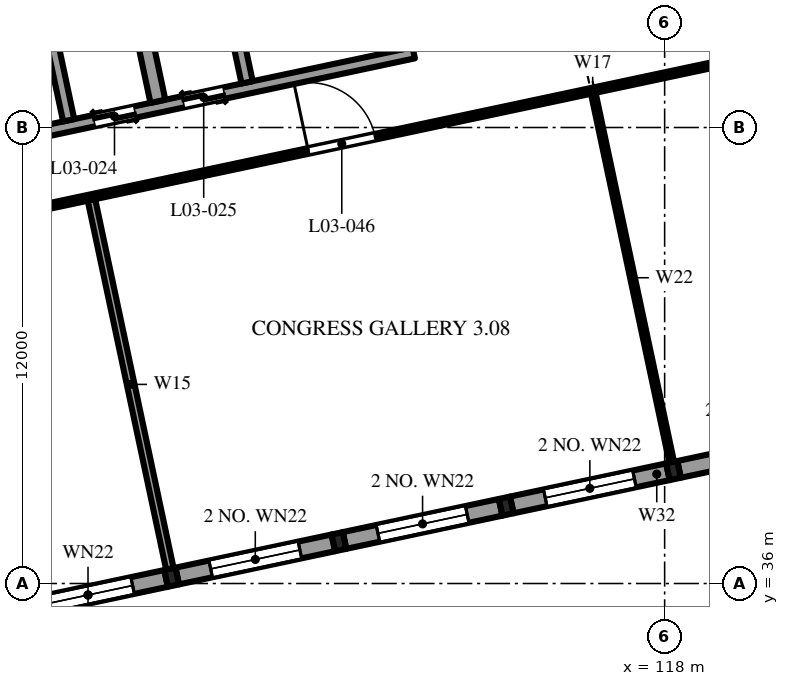
"""IFC4 building model, lengths in metres.
Left out: names, types, materials, properties, quantities, classifications, styles, units other than length and angle.
Written with IfcOpenShell. Run it as: python <this file> out.ifc"""

import sys

from ifc_helpers import new_model, si_unit, direction, frame, frame_2d, origin, origin_2d, place, context, subcontext, project, spatial, polyline, rectangle, i_section, outline, extrude, element, fill, save


model = new_model("IFC4")
c1 = context("Model", 3, precision=1e-05, world=origin(), true_north=direction((0.0, 1.0)))
c2 = subcontext(c1, "Body", "Model", "MODEL_VIEW")
j1 = project(units=[si_unit("LENGTHUNIT", "METRE"), si_unit("PLANEANGLEUNIT", "RADIAN")], contexts=[c1])
p1 = place(None, origin())
s1 = spatial("IfcSite", under=j1, at=p1, CompositionType="ELEMENT")
p2 = place(p1, origin())
s2 = spatial("IfcBuilding", under=s1, at=p2, CompositionType="ELEMENT")
p3 = place(p2, frame((0.0, 0.0, 16.8)))
s3 = spatial("IfcBuildingStorey", under=s2, at=p3, CompositionType="ELEMENT", Elevation=16.8)
for number, where, z_axis, x_axis in (
    (1, (105.028, 36.165, 0.0), (0.0, 0.0, 1.0), (0.978, 0.208, 0.0)),
    (2, (109.429, 37.101, 0.0), (0.0, 0.0, 1.0), (0.978, 0.208, 0.0)),
    (3, (113.831, 38.036, 0.0), (0.0, 0.0, 1.0), (0.978, 0.208, 0.0)),
    (4, (118.233, 38.972, 0.0), (0.0, 0.0, 1.0), (0.978, 0.208, 0.0)),
):
    element("IfcColumn", number, at=place(p3, frame(where, z_axis=z_axis, x_axis=x_axis)), inside=s3, PredefinedType="COLUMN", context=c2, shape_type="SweptSolid", body=[
        extrude(i_section(OverallWidth=0.3, OverallDepth=0.45, WebThickness=0.014, FlangeThickness=0.026, FilletRadius=0.027, at=origin_2d()), origin(), (0.0, 0.0, 1.0), 4.8),
    ])
p4 = place(p3, frame((97.997, 47.118, 0.0), z_axis=(0.0, 0.0, 1.0), x_axis=(0.978147662755, 0.20791139903, 0.0)))
e5 = element("IfcWall", 5, at=p4, inside=s3, PredefinedType="SHEAR", context=c2, shape_type="SweptSolid", body=[
    extrude(outline(polyline([(0.0, 0.0), (13.7, 0.0), (13.7, 9.076), (0.0, 8.344), (0.0, 0.0)])), frame((0.0, 0.15, 0.0), z_axis=(0.0, -1.0, 0.0), x_axis=(1.0, 0.0, 0.0)), (0.0, 0.0, 1.0), 0.3),
])
p5 = place(p4, frame((5.1, 0.0, 0.0)))
e6 = element("IfcOpeningElement", 6, at=p5, cuts=e5, PredefinedType="OPENING", context=c2, shape_type="SweptSolid", body=[
    extrude(rectangle(XDim=1.1, YDim=2.1, at=frame_2d((0.55, 1.05))), frame((0.0, 0.16, 0.0), z_axis=(0.0, -1.0, 0.0), x_axis=(1.0, 0.0, 0.0)), (0.0, 0.0, 1.0), 0.32),
])
p6 = place(p4, frame((7.5, 0.0, 0.0)))
e7 = element("IfcOpeningElement", 7, at=p6, cuts=e5, PredefinedType="OPENING", context=c2, shape_type="SweptSolid", body=[
    extrude(rectangle(XDim=1.1, YDim=2.1, at=frame_2d((0.55, 1.05))), frame((0.0, 0.16, 0.0), z_axis=(0.0, -1.0, 0.0), x_axis=(1.0, 0.0, 0.0)), (0.0, 0.0, 1.0), 0.32),
])
p7 = place(p3, frame((100.655, 56.015, 0.0), z_axis=(0.0, 0.0, 1.0), x_axis=(0.207915693476, -0.978146749934, 0.0)))
e8 = element("IfcWall", 8, at=p7, inside=s3, PredefinedType="SHEAR", context=c2, shape_type="SweptSolid", body=[
    extrude(outline(polyline([(0.0, 0.0), (8.0, 0.0), (8.0, 8.574), (0.0, 8.155), (0.0, 0.0)])), frame((0.0, 0.15, 0.0), z_axis=(0.0, -1.0, 0.0), x_axis=(1.0, 0.0, 0.0)), (0.0, 0.0, 1.0), 0.3),
])
p8 = place(p3, frame((105.35, 57.013, 0.0), z_axis=(0.0, 0.0, 1.0), x_axis=(0.207915693476, -0.978146749934, 0.0)))
e9 = element("IfcWall", 9, at=p8, inside=s3, PredefinedType="SHEAR", context=c2, shape_type="SweptSolid", body=[
    extrude(outline(polyline([(0.0, 0.0), (8.0, 0.0), (8.0, 8.831), (0.0, 8.411), (0.0, 0.0)])), frame((0.0, 0.15, 0.0), z_axis=(0.0, -1.0, 0.0), x_axis=(1.0, 0.0, 0.0)), (0.0, 0.0, 1.0), 0.3),
])
p9 = place(p3, frame((104.042, 51.623, 0.0), z_axis=(0.0, 0.0, 1.0), x_axis=(0.207917150959, -0.978146440129, 0.0)))
e10 = element("IfcWall", 10, at=p9, inside=s3, PredefinedType="SHEAR", context=c2, shape_type="SweptSolid", body=[
    extrude(outline(polyline([(0.0, 0.0), (3.0, 0.0), (3.0, 8.702), (0.0, 8.545), (0.0, 0.0)])), frame((0.0, 0.2, 0.0), z_axis=(0.0, -1.0, 0.0), x_axis=(1.0, 0.0, 0.0)), (0.0, 0.0, 1.0), 0.4),
])
p10 = place(p3, frame((100.773, 35.261, 0.0), z_axis=(0.0, 0.0, 1.0), x_axis=(0.978143927149, 0.207928972925, 0.0)))
e11 = element("IfcWall", 11, at=p10, inside=s3, PredefinedType="SOLIDWALL", context=c2, shape_type="SweptSolid", body=[
    extrude(outline(polyline([(0.0, 0.0), (4.2, 0.0), (4.2, 10.52), (0.0, 10.295), (0.0, 0.0)])), frame((0.0, 0.225, 0.0), z_axis=(0.0, -1.0, 0.0), x_axis=(1.0, 0.0, 0.0)), (0.0, 0.0, 1.0), 0.45),
])
p11 = place(p10, frame((0.9, 0.0, 0.6)))
e12 = element("IfcOpeningElement", 12, at=p11, cuts=e11, PredefinedType="OPENING", context=c2, shape_type="SweptSolid", body=[
    extrude(rectangle(XDim=2.4, YDim=2.7, at=frame_2d((1.2, 1.35))), frame((0.0, 0.235, 0.0), z_axis=(0.0, -1.0, 0.0), x_axis=(1.0, 0.0, 0.0)), (0.0, 0.0, 1.0), 0.47),
])
p12 = place(p10, frame((0.9, 0.0, 5.1)))
e13 = element("IfcOpeningElement", 13, at=p12, cuts=e11, PredefinedType="OPENING", context=c2, shape_type="SweptSolid", body=[
    extrude(rectangle(XDim=2.4, YDim=2.4, at=frame_2d((1.2, 1.2))), frame((0.0, 0.235, 0.0), z_axis=(0.0, -1.0, 0.0), x_axis=(1.0, 0.0, 0.0)), (0.0, 0.0, 1.0), 0.47),
])
p13 = place(p3, frame((105.174, 36.197, 0.0), z_axis=(0.0, 0.0, 1.0), x_axis=(0.978155748334, 0.207873355681, 0.0)))
e14 = element("IfcWall", 14, at=p13, inside=s3, PredefinedType="SOLIDWALL", context=c2, shape_type="SweptSolid", body=[
    extrude(outline(polyline([(0.0, 0.0), (4.2, 0.0), (4.2, 10.76), (0.0, 10.536), (0.0, 0.0)])), frame((0.0, 0.225, 0.0), z_axis=(0.0, -1.0, 0.0), x_axis=(1.0, 0.0, 0.0)), (0.0, 0.0, 1.0), 0.45),
])
p14 = place(p13, frame((0.9, 0.0, 0.9)))
e15 = element("IfcOpeningElement", 15, at=p14, cuts=e14, PredefinedType="OPENING", context=c2, shape_type="SweptSolid", body=[
    extrude(rectangle(XDim=2.4, YDim=2.4, at=frame_2d((1.2, 1.2))), frame((0.0, 0.235, 0.0), z_axis=(0.0, -1.0, 0.0), x_axis=(1.0, 0.0, 0.0)), (0.0, 0.0, 1.0), 0.47),
])
p15 = place(p13, frame((0.9, 0.0, 5.1)))
e16 = element("IfcOpeningElement", 16, at=p15, cuts=e14, PredefinedType="OPENING", context=c2, shape_type="SweptSolid", body=[
    extrude(rectangle(XDim=2.4, YDim=2.4, at=frame_2d((1.2, 1.2))), frame((0.0, 0.235, 0.0), z_axis=(0.0, -1.0, 0.0), x_axis=(1.0, 0.0, 0.0)), (0.0, 0.0, 1.0), 0.47),
])
p16 = place(p3, frame((109.576, 37.132, 0.0), z_axis=(0.0, 0.0, 1.0), x_axis=(0.978146440129, 0.207917150959, 0.0)))
e17 = element("IfcWall", 17, at=p16, inside=s3, PredefinedType="SOLIDWALL", context=c2, shape_type="SweptSolid", body=[
    extrude(outline(polyline([(0.0, 0.0), (4.2, 0.0), (4.2, 11.001), (0.0, 10.776), (0.0, 0.0)])), frame((0.0, 0.225, 0.0), z_axis=(0.0, -1.0, 0.0), x_axis=(1.0, 0.0, 0.0)), (0.0, 0.0, 1.0), 0.45),
])
p17 = place(p16, frame((0.9, 0.0, 0.9)))
e18 = element("IfcOpeningElement", 18, at=p17, cuts=e17, PredefinedType="OPENING", context=c2, shape_type="SweptSolid", body=[
    extrude(rectangle(XDim=2.4, YDim=2.4, at=frame_2d((1.2, 1.2))), frame((0.0, 0.235, 0.0), z_axis=(0.0, -1.0, 0.0), x_axis=(1.0, 0.0, 0.0)), (0.0, 0.0, 1.0), 0.47),
])
p18 = place(p16, frame((0.9, 0.0, 5.1)))
e19 = element("IfcOpeningElement", 19, at=p18, cuts=e17, PredefinedType="OPENING", context=c2, shape_type="SweptSolid", body=[
    extrude(rectangle(XDim=2.4, YDim=2.4, at=frame_2d((1.2, 1.2))), frame((0.0, 0.235, 0.0), z_axis=(0.0, -1.0, 0.0), x_axis=(1.0, 0.0, 0.0)), (0.0, 0.0, 1.0), 0.47),
])
p19 = place(p3, frame((113.978, 38.068, 0.0), z_axis=(0.0, 0.0, 1.0), x_axis=(0.978143927149, 0.207928972925, 0.0)))
e20 = element("IfcWall", 20, at=p19, inside=s3, PredefinedType="SOLIDWALL", context=c2, shape_type="SweptSolid", body=[
    extrude(outline(polyline([(0.0, 0.0), (4.2, 0.0), (4.2, 11.242), (0.0, 11.017), (0.0, 0.0)])), frame((0.0, 0.225, 0.0), z_axis=(0.0, -1.0, 0.0), x_axis=(1.0, 0.0, 0.0)), (0.0, 0.0, 1.0), 0.45),
])
p20 = place(p19, frame((0.9, 0.0, 0.9)))
e21 = element("IfcOpeningElement", 21, at=p20, cuts=e20, PredefinedType="OPENING", context=c2, shape_type="SweptSolid", body=[
    extrude(rectangle(XDim=2.4, YDim=2.4, at=frame_2d((1.2, 1.2))), frame((0.0, 0.235, 0.0), z_axis=(0.0, -1.0, 0.0), x_axis=(1.0, 0.0, 0.0)), (0.0, 0.0, 1.0), 0.47),
])
p21 = place(p19, frame((0.9, 0.0, 5.1)))
e22 = element("IfcOpeningElement", 22, at=p21, cuts=e20, PredefinedType="OPENING", context=c2, shape_type="SweptSolid", body=[
    extrude(rectangle(XDim=2.4, YDim=2.4, at=frame_2d((1.2, 1.2))), frame((0.0, 0.235, 0.0), z_axis=(0.0, -1.0, 0.0), x_axis=(1.0, 0.0, 0.0)), (0.0, 0.0, 1.0), 0.47),
])
p22 = place(p3, frame((118.379, 39.003, 0.0), z_axis=(0.0, 0.0, 1.0), x_axis=(0.978143927149, 0.207928972925, 0.0)))
e23 = element("IfcWall", 23, at=p22, inside=s3, PredefinedType="SOLIDWALL", context=c2, shape_type="SweptSolid", body=[
    extrude(outline(polyline([(0.0, 0.0), (4.2, 0.0), (4.2, 11.483), (0.0, 11.258), (0.0, 0.0)])), frame((0.0, 0.225, 0.0), z_axis=(0.0, -1.0, 0.0), x_axis=(1.0, 0.0, 0.0)), (0.0, 0.0, 1.0), 0.45),
])
p23 = place(p22, frame((0.9, 0.0, 0.9)))
e24 = element("IfcOpeningElement", 24, at=p23, cuts=e23, PredefinedType="OPENING", context=c2, shape_type="SweptSolid", body=[
    extrude(rectangle(XDim=2.4, YDim=2.4, at=frame_2d((1.2, 1.2))), frame((0.0, 0.235, 0.0), z_axis=(0.0, -1.0, 0.0), x_axis=(1.0, 0.0, 0.0)), (0.0, 0.0, 1.0), 0.47),
])
p24 = place(p22, frame((0.9, 0.0, 5.1)))
e25 = element("IfcOpeningElement", 25, at=p24, cuts=e23, PredefinedType="OPENING", context=c2, shape_type="SweptSolid", body=[
    extrude(rectangle(XDim=2.4, YDim=2.4, at=frame_2d((1.2, 1.2))), frame((0.0, 0.235, 0.0), z_axis=(0.0, -1.0, 0.0), x_axis=(1.0, 0.0, 0.0)), (0.0, 0.0, 1.0), 0.47),
])
p25 = place(p3, frame((80.893, 41.489, 0.0), z_axis=(0.0, 0.0, 1.0), x_axis=(0.97814724207, 0.20791337819, 0.0)))
e26 = element("IfcWall", 26, at=p25, inside=s3, PredefinedType="PARTITIONING", context=c2, shape_type="SweptSolid", body=[
    extrude(outline(polyline([(0.0, 0.0), (49.5, 0.0), (49.5, 9.336), (0.0, 6.688), (0.0, 0.0)])), frame((0.0, 0.075, 0.0), z_axis=(0.0, -1.0, 0.0), x_axis=(1.0, 0.0, 0.0)), (0.0, 0.0, 1.0), 0.15),
])
p26 = place(p25, frame((5.85, 0.0, 0.0)))
e27 = element("IfcOpeningElement", 27, at=p26, cuts=e26, PredefinedType="OPENING", context=c2, shape_type="SweptSolid", body=[
    extrude(rectangle(XDim=1.8, YDim=2.1, at=frame_2d((0.9, 1.05))), frame((0.0, 0.085, 0.0), z_axis=(0.0, -1.0, 0.0), x_axis=(1.0, 0.0, 0.0)), (0.0, 0.0, 1.0), 0.17),
])
p27 = place(p25, frame((17.25, 0.0, 0.0)))
e28 = element("IfcOpeningElement", 28, at=p27, cuts=e26, PredefinedType="OPENING", context=c2, shape_type="SweptSolid", body=[
    extrude(rectangle(XDim=1.5, YDim=2.1, at=frame_2d((0.75, 1.05))), frame((0.0, 0.085, 0.0), z_axis=(0.0, -1.0, 0.0), x_axis=(1.0, 0.0, 0.0)), (0.0, 0.0, 1.0), 0.17),
])
p28 = place(p25, frame((28.35, 0.0, 0.0)))
e29 = element("IfcOpeningElement", 29, at=p28, cuts=e26, PredefinedType="OPENING", context=c2, shape_type="SweptSolid", body=[
    extrude(rectangle(XDim=1.8, YDim=2.1, at=frame_2d((0.9, 1.05))), frame((0.0, 0.085, 0.0), z_axis=(0.0, -1.0, 0.0), x_axis=(1.0, 0.0, 0.0)), (0.0, 0.0, 1.0), 0.17),
])
p29 = place(p25, frame((41.85, 0.0, 0.0)))
e30 = element("IfcOpeningElement", 30, at=p29, cuts=e26, PredefinedType="OPENING", context=c2, shape_type="SweptSolid", body=[
    extrude(rectangle(XDim=1.8, YDim=2.1, at=frame_2d((0.9, 1.05))), frame((0.0, 0.085, 0.0), z_axis=(0.0, -1.0, 0.0), x_axis=(1.0, 0.0, 0.0)), (0.0, 0.0, 1.0), 0.17),
])
p30 = place(p3, frame((104.981, 36.385, 0.0), z_axis=(0.0, 0.0, 1.0), x_axis=(-0.207927890391, 0.978144157268, 0.0)))
e31 = element("IfcWall", 31, at=p30, inside=s3, PredefinedType="PARTITIONING", context=c2, shape_type="SweptSolid", body=[
    extrude(outline(polyline([(0.0, 0.0), (9.925, 0.0), (9.925, 7.896), (0.0, 8.097), (0.0, 0.0)])), frame((0.0, 0.1, 0.0), z_axis=(0.0, -1.0, 0.0), x_axis=(1.0, 0.0, 0.0)), (0.0, 0.0, 1.0), 0.2),
])
p31 = place(p3, frame((118.186, 39.192, 0.0), z_axis=(0.0, 0.0, 1.0), x_axis=(-0.207904355568, 0.978149159861, 0.0)))
e32 = element("IfcWall", 32, at=p31, inside=s3, PredefinedType="PARTITIONING", context=c2, shape_type="SweptSolid", body=[
    extrude(outline(polyline([(0.0, 0.0), (9.925, 0.0), (9.925, 7.899), (0.0, 7.899), (0.0, 0.0)])), frame((0.0, 0.062, 0.0), z_axis=(0.0, -1.0, 0.0), x_axis=(1.0, 0.0, 0.0)), (0.0, 0.0, 1.0), 0.125),
])
p32 = place(p11, origin())
e33 = element("IfcWindow", 33, at=p32, inside=s3, PartitioningType="SINGLE_PANEL", PredefinedType="WINDOW", context=c2, shape_type="SweptSolid", body=[
    extrude(rectangle(XDim=2.4, YDim=2.7, at=frame_2d((1.2, 1.35))), frame((0.0, 0.03, 0.0), z_axis=(0.0, -1.0, 0.0), x_axis=(1.0, 0.0, 0.0)), (0.0, 0.0, 1.0), 0.06),
])
fill(e12, e33)
p33 = place(p12, origin())
e34 = element("IfcWindow", 34, at=p33, inside=s3, PartitioningType="SINGLE_PANEL", PredefinedType="WINDOW", context=c2, shape_type="SweptSolid", body=[
    extrude(rectangle(XDim=2.4, YDim=2.4, at=frame_2d((1.2, 1.2))), frame((0.0, 0.03, 0.0), z_axis=(0.0, -1.0, 0.0), x_axis=(1.0, 0.0, 0.0)), (0.0, 0.0, 1.0), 0.06),
])
fill(e13, e34)
p34 = place(p14, origin())
e35 = element("IfcWindow", 35, at=p34, inside=s3, PartitioningType="SINGLE_PANEL", PredefinedType="WINDOW", context=c2, shape_type="SweptSolid", body=[
    extrude(rectangle(XDim=2.4, YDim=2.4, at=frame_2d((1.2, 1.2))), frame((0.0, 0.03, 0.0), z_axis=(0.0, -1.0, 0.0), x_axis=(1.0, 0.0, 0.0)), (0.0, 0.0, 1.0), 0.06),
])
fill(e15, e35)
p35 = place(p15, origin())
e36 = element("IfcWindow", 36, at=p35, inside=s3, PartitioningType="SINGLE_PANEL", PredefinedType="WINDOW", context=c2, shape_type="SweptSolid", body=[
    extrude(rectangle(XDim=2.4, YDim=2.4, at=frame_2d((1.2, 1.2))), frame((0.0, 0.03, 0.0), z_axis=(0.0, -1.0, 0.0), x_axis=(1.0, 0.0, 0.0)), (0.0, 0.0, 1.0), 0.06),
])
fill(e16, e36)
p36 = place(p17, origin())
e37 = element("IfcWindow", 37, at=p36, inside=s3, PartitioningType="SINGLE_PANEL", PredefinedType="WINDOW", context=c2, shape_type="SweptSolid", body=[
    extrude(rectangle(XDim=2.4, YDim=2.4, at=frame_2d((1.2, 1.2))), frame((0.0, 0.03, 0.0), z_axis=(0.0, -1.0, 0.0), x_axis=(1.0, 0.0, 0.0)), (0.0, 0.0, 1.0), 0.06),
])
fill(e18, e37)
p37 = place(p18, origin())
e38 = element("IfcWindow", 38, at=p37, inside=s3, PartitioningType="SINGLE_PANEL", PredefinedType="WINDOW", context=c2, shape_type="SweptSolid", body=[
    extrude(rectangle(XDim=2.4, YDim=2.4, at=frame_2d((1.2, 1.2))), frame((0.0, 0.03, 0.0), z_axis=(0.0, -1.0, 0.0), x_axis=(1.0, 0.0, 0.0)), (0.0, 0.0, 1.0), 0.06),
])
fill(e19, e38)
p38 = place(p20, origin())
e39 = element("IfcWindow", 39, at=p38, inside=s3, PartitioningType="SINGLE_PANEL", PredefinedType="WINDOW", context=c2, shape_type="SweptSolid", body=[
    extrude(rectangle(XDim=2.4, YDim=2.4, at=frame_2d((1.2, 1.2))), frame((0.0, 0.03, 0.0), z_axis=(0.0, -1.0, 0.0), x_axis=(1.0, 0.0, 0.0)), (0.0, 0.0, 1.0), 0.06),
])
fill(e21, e39)
p39 = place(p21, origin())
e40 = element("IfcWindow", 40, at=p39, inside=s3, PartitioningType="SINGLE_PANEL", PredefinedType="WINDOW", context=c2, shape_type="SweptSolid", body=[
    extrude(rectangle(XDim=2.4, YDim=2.4, at=frame_2d((1.2, 1.2))), frame((0.0, 0.03, 0.0), z_axis=(0.0, -1.0, 0.0), x_axis=(1.0, 0.0, 0.0)), (0.0, 0.0, 1.0), 0.06),
])
fill(e22, e40)
p40 = place(p5, frame((1.1, 0.0, 0.0), z_axis=(0.0, 0.0, 1.0), x_axis=(-1.0, 0.0, 0.0)))
e41 = element("IfcDoor", 41, at=p40, inside=s3, OperationType="DOUBLE_DOOR_SLIDING", PredefinedType="DOOR", context=c2, shape_type="SweptSolid", body=[
    extrude(rectangle(XDim=1.1, YDim=2.1, at=frame_2d((0.55, 1.05))), frame((0.0, 0.025, 0.0), z_axis=(0.0, -1.0, 0.0), x_axis=(1.0, 0.0, 0.0)), (0.0, 0.0, 1.0), 0.05),
])
fill(e6, e41)
p41 = place(p6, frame((1.1, 0.0, 0.0), z_axis=(0.0, 0.0, 1.0), x_axis=(-1.0, 0.0, 0.0)))
e42 = element("IfcDoor", 42, at=p41, inside=s3, OperationType="DOUBLE_DOOR_SLIDING", PredefinedType="DOOR", context=c2, shape_type="SweptSolid", body=[
    extrude(rectangle(XDim=1.1, YDim=2.1, at=frame_2d((0.55, 1.05))), frame((0.0, 0.025, 0.0), z_axis=(0.0, -1.0, 0.0), x_axis=(1.0, 0.0, 0.0)), (0.0, 0.0, 1.0), 0.05),
])
fill(e7, e42)
p42 = place(p28, origin())
e43 = element("IfcDoor", 43, at=p42, inside=s3, OperationType="DOUBLE_DOOR_SINGLE_SWING", PredefinedType="DOOR", context=c2, shape_type="SweptSolid", body=[
    extrude(rectangle(XDim=1.8, YDim=2.1, at=frame_2d((0.9, 1.05))), frame((0.0, 0.025, 0.0), z_axis=(0.0, -1.0, 0.0), x_axis=(1.0, 0.0, 0.0)), (0.0, 0.0, 1.0), 0.05),
])
fill(e29, e43)
save(model, sys.argv[1])
